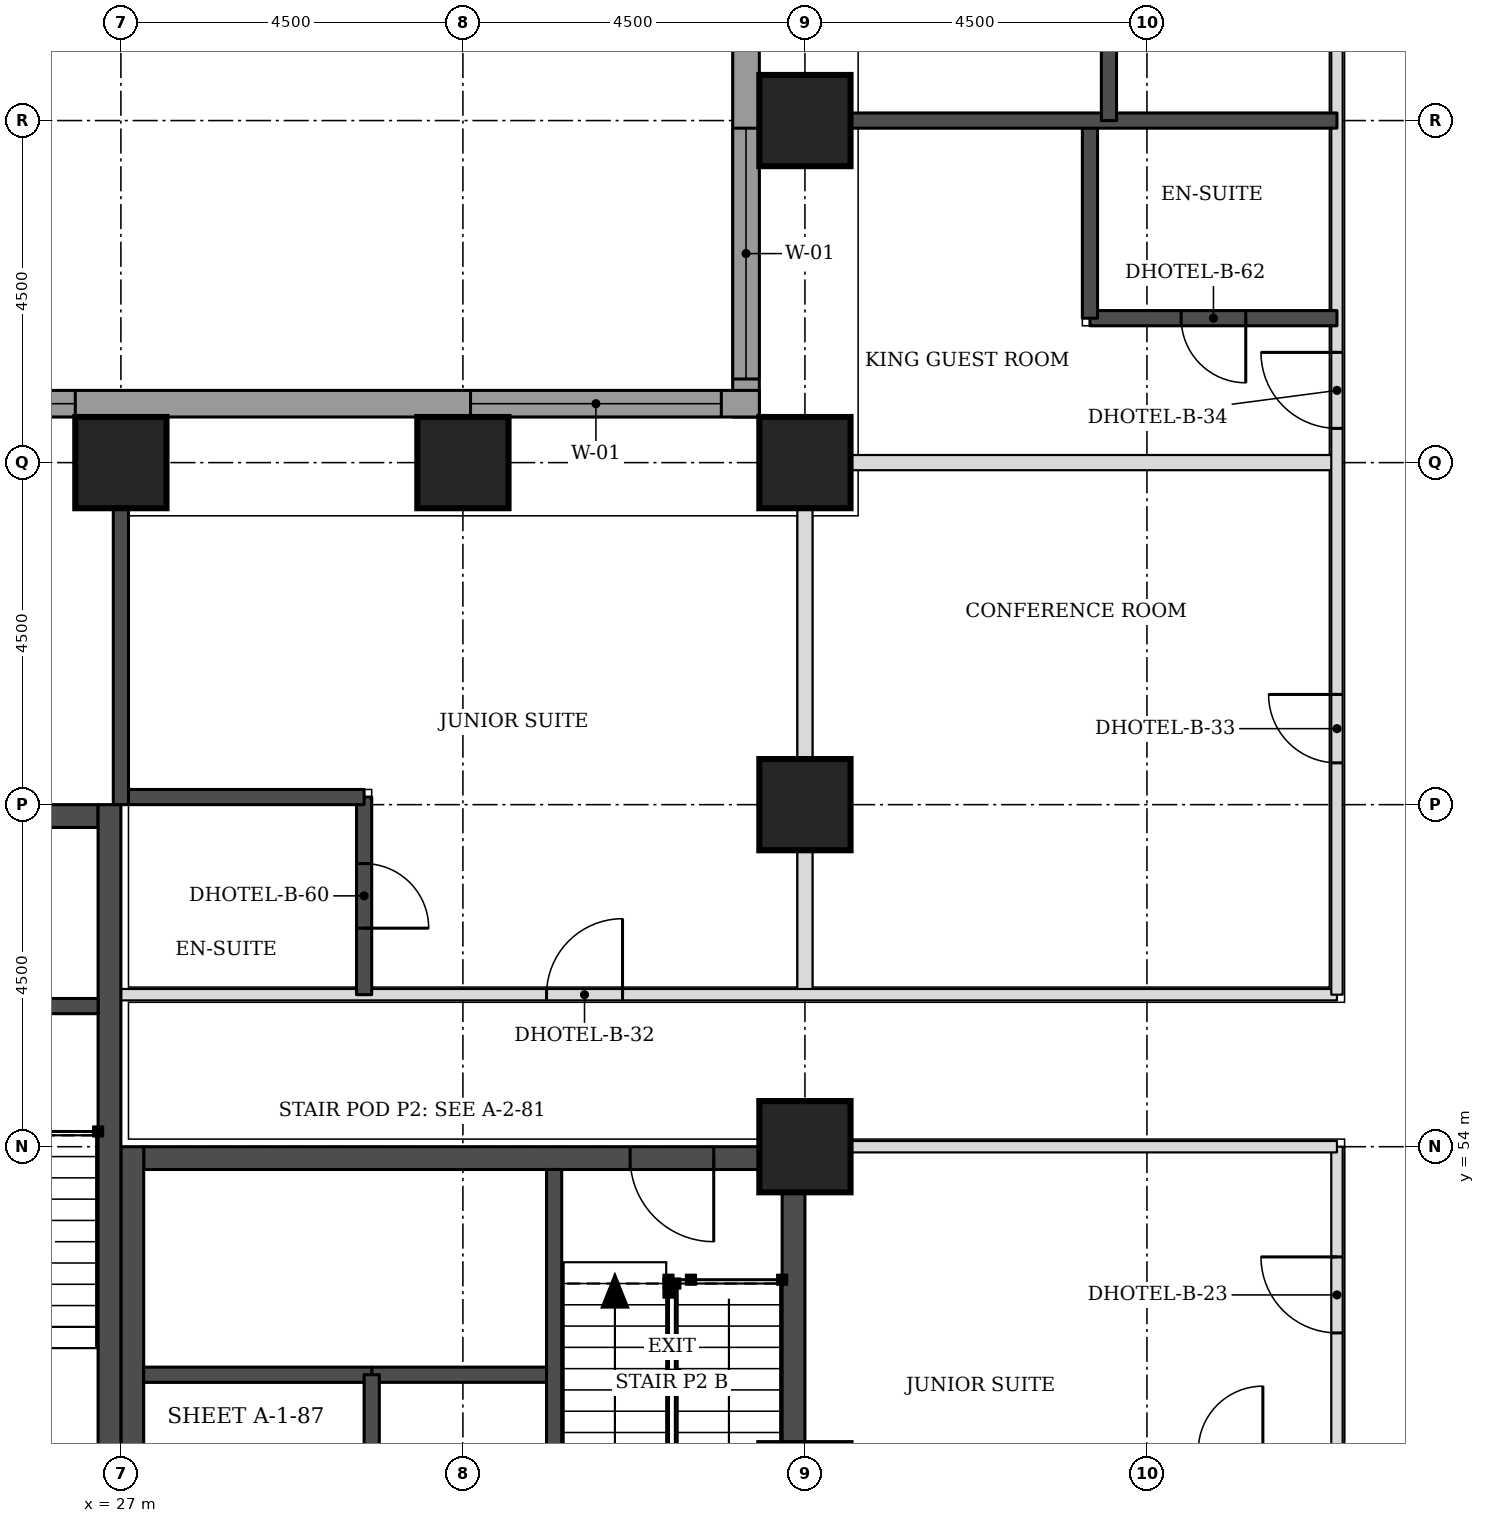
"""IFC4 building model, lengths in metres.
Left out: names, types, materials, properties, quantities, classifications, styles, units other than length and angle.
Written with IfcOpenShell. Run it as: python <this file> out.ifc"""

import sys

from ifc_helpers import new_model, si_unit, direction, frame, frame_2d, origin, origin_2d, place, context, subcontext, project, spatial, rectangle, extrude, element, fill, save


model = new_model("IFC4")
c1 = context("Model", 3, precision=1e-05, world=origin(), true_north=direction((0.0, 1.0)))
c2 = subcontext(c1, "Body", "Model", "MODEL_VIEW")
j1 = project(units=[si_unit("LENGTHUNIT", "METRE"), si_unit("PLANEANGLEUNIT", "RADIAN")], contexts=[c1])
p1 = place(None, origin())
s1 = spatial("IfcSite", under=j1, at=p1, CompositionType="ELEMENT")
p2 = place(p1, origin())
s2 = spatial("IfcBuilding", under=s1, at=p2, CompositionType="ELEMENT")
p3 = place(p2, frame((0.0, 0.0, 52.8)))
s3 = spatial("IfcBuildingStorey", under=s2, at=p3, CompositionType="ELEMENT", Elevation=52.8)
for number, where, z_axis, x_axis in (
    (1, (36.0, 54.0, 0.0), (0.0, 0.0, 1.0), (1.0, 0.0, 0.0)),
    (2, (36.0, 58.5, 0.0), (0.0, 0.0, 1.0), (1.0, 0.0, 0.0)),
    (3, (27.0, 63.0, 0.0), (0.0, 0.0, 1.0), (1.0, 0.0, 0.0)),
    (4, (31.5, 63.0, 0.0), (0.0, 0.0, 1.0), (1.0, 0.0, 0.0)),
    (5, (36.0, 63.0, 0.0), (0.0, 0.0, 1.0), (1.0, 0.0, 0.0)),
    (6, (36.0, 67.5, 0.0), (0.0, 0.0, 1.0), (1.0, 0.0, 0.0)),
):
    element("IfcColumn", number, at=place(p3, frame(where, z_axis=z_axis, x_axis=x_axis)), inside=s3, PredefinedType="COLUMN", context=c2, shape_type="SweptSolid", body=[
        extrude(rectangle(XDim=1.2, YDim=1.2, at=origin_2d()), origin(), (0.0, 0.0, 1.0), 3.3),
    ])
p4 = place(p3, frame((27.3, 53.85, 0.0), z_axis=(0.0, 0.0, 1.0), x_axis=(1.0, 0.0, 0.0)))
e7 = element("IfcWall", 7, at=p4, inside=s3, PredefinedType="SHEAR", context=c2, shape_type="SweptSolid", body=[
    extrude(rectangle(XDim=8.4, YDim=0.3, at=frame_2d((4.2, 0.0))), origin(), (0.0, 0.0, 1.0), 3.3),
])
p5 = place(p4, frame((6.4, 0.0, 0.0)))
e8 = element("IfcOpeningElement", 8, at=p5, cuts=e7, PredefinedType="OPENING", context=c2, shape_type="SweptSolid", body=[
    extrude(rectangle(XDim=1.1, YDim=2.1, at=frame_2d((0.55, 1.05))), frame((0.0, 0.16, 0.0), z_axis=(0.0, -1.0, 0.0), x_axis=(1.0, 0.0, 0.0)), (0.0, 0.0, 1.0), 0.32),
])
p6 = place(p3, frame((27.15, 45.0, 0.0), z_axis=(0.0, 0.0, 1.0), x_axis=(0.0, 1.0, 0.0)))
e9 = element("IfcWall", 9, at=p6, inside=s3, PredefinedType="SHEAR", context=c2, shape_type="SweptSolid", body=[
    extrude(rectangle(XDim=9.0, YDim=0.3, at=frame_2d((4.5, 0.0))), origin(), (0.0, 0.0, 1.0), 3.3),
])
p7 = place(p6, frame((0.4, 0.0, 0.0)))
e10 = element("IfcOpeningElement", 10, at=p7, cuts=e9, PredefinedType="OPENING", context=c2, shape_type="SweptSolid", body=[
    extrude(rectangle(XDim=1.1, YDim=2.1, at=frame_2d((0.55, 1.05))), frame((0.0, 0.16, 0.0), z_axis=(0.0, -1.0, 0.0), x_axis=(1.0, 0.0, 0.0)), (0.0, 0.0, 1.0), 0.32),
])
p8 = place(p3, frame((35.85, 45.0, 0.0), z_axis=(0.0, 0.0, 1.0), x_axis=(0.0, 1.0, 0.0)))
e11 = element("IfcWall", 11, at=p8, inside=s3, PredefinedType="SHEAR", context=c2, shape_type="SweptSolid", body=[
    extrude(rectangle(XDim=9.0, YDim=0.3, at=frame_2d((4.5, 0.0))), origin(), (0.0, 0.0, 1.0), 3.3),
])
p9 = place(p3, frame((18.3, 58.35, 0.0), z_axis=(0.0, 0.0, 1.0), x_axis=(1.0, 0.0, 0.0)))
e12 = element("IfcWall", 12, at=p9, inside=s3, PredefinedType="SHEAR", context=c2, shape_type="SweptSolid", body=[
    extrude(rectangle(XDim=8.4, YDim=0.3, at=frame_2d((4.2, 0.0))), origin(), (0.0, 0.0, 1.0), 3.3),
])
p10 = place(p9, frame((3.3, 0.0, 0.0)))
e13 = element("IfcOpeningElement", 13, at=p10, cuts=e12, PredefinedType="OPENING", context=c2, shape_type="SweptSolid", body=[
    extrude(rectangle(XDim=1.8, YDim=2.1, at=frame_2d((0.9, 1.05))), frame((0.0, 0.16, 0.0), z_axis=(0.0, -1.0, 0.0), x_axis=(1.0, 0.0, 0.0)), (0.0, 0.0, 1.0), 0.32),
])
p11 = place(p3, frame((26.85, 49.5, 0.0), z_axis=(0.0, 0.0, 1.0), x_axis=(0.0, 1.0, 0.0)))
e14 = element("IfcWall", 14, at=p11, inside=s3, PredefinedType="SHEAR", context=c2, shape_type="SweptSolid", body=[
    extrude(rectangle(XDim=9.0, YDim=0.3, at=frame_2d((4.5, 0.0))), origin(), (0.0, 0.0, 1.0), 3.3),
])
p12 = place(p3, frame((35.225, 76.894, 0.0), z_axis=(0.0, 0.0, 1.0), x_axis=(0.0, -1.0, 0.0)))
e15 = element("IfcWall", 15, at=p12, inside=s3, PredefinedType="STANDARD", context=c2, shape_type="SweptSolid", body=[
    extrude(rectangle(XDim=13.293, YDim=0.35, at=frame_2d((6.647, 0.0))), origin(), (0.0, 0.0, 1.0), 3.055),
])
p13 = place(p12, frame((9.493, 0.0, 0.8)))
e16 = element("IfcOpeningElement", 16, at=p13, cuts=e15, PredefinedType="OPENING", context=c2, shape_type="SweptSolid", body=[
    extrude(rectangle(XDim=3.3, YDim=1.5, at=frame_2d((1.65, 0.75))), frame((0.0, 0.185, 0.0), z_axis=(0.0, -1.0, 0.0), x_axis=(1.0, 0.0, 0.0)), (0.0, 0.0, 1.0), 0.37),
])
p14 = place(p3, frame((35.4, 63.775, 0.0), z_axis=(0.0, 0.0, 1.0), x_axis=(-1.0, 0.0, 0.0)))
e17 = element("IfcWall", 17, at=p14, inside=s3, PredefinedType="STANDARD", context=c2, shape_type="SweptSolid", body=[
    extrude(rectangle(XDim=17.793, YDim=0.35, at=frame_2d((8.897, 0.0))), origin(), (0.0, 0.0, 1.0), 3.055),
])
p15 = place(p14, frame((0.5, 0.0, 0.8)))
e18 = element("IfcOpeningElement", 18, at=p15, cuts=e17, PredefinedType="OPENING", context=c2, shape_type="SweptSolid", body=[
    extrude(rectangle(XDim=3.3, YDim=1.5, at=frame_2d((1.65, 0.75))), frame((0.0, 0.185, 0.0), z_axis=(0.0, -1.0, 0.0), x_axis=(1.0, 0.0, 0.0)), (0.0, 0.0, 1.0), 0.37),
])
p16 = place(p14, frame((9.0, 0.0, 0.8)))
e19 = element("IfcOpeningElement", 19, at=p16, cuts=e17, PredefinedType="OPENING", context=c2, shape_type="SweptSolid", body=[
    extrude(rectangle(XDim=3.3, YDim=1.5, at=frame_2d((1.65, 0.75))), frame((0.0, 0.185, 0.0), z_axis=(0.0, -1.0, 0.0), x_axis=(1.0, 0.0, 0.0)), (0.0, 0.0, 1.0), 0.37),
])
p17 = place(p3, frame((36.0, 56.0, 0.0), z_axis=(0.0, 0.0, 1.0), x_axis=(0.0, 1.0, 0.0)))
e20 = element("IfcWall", 20, at=p17, inside=s3, PredefinedType="PARTITIONING", context=c2, shape_type="SweptSolid", body=[
    extrude(rectangle(XDim=6.4, YDim=0.2, at=frame_2d((3.2, 0.0))), origin(), (0.0, 0.0, 1.0), 2.33),
])
p18 = place(p3, frame((36.6, 63.0, 0.0), z_axis=(0.0, 0.0, 1.0), x_axis=(1.0, 0.0, 0.0)))
e21 = element("IfcWall", 21, at=p18, inside=s3, PredefinedType="PARTITIONING", context=c2, shape_type="SweptSolid", body=[
    extrude(rectangle(XDim=6.4, YDim=0.2, at=frame_2d((3.2, 0.0))), origin(), (0.0, 0.0, 1.0), 3.08),
])
p19 = place(p3, frame((43.0, 47.5, 0.0), z_axis=(0.0, 0.0, 1.0), x_axis=(0.0, 1.0, 0.0)))
e22 = element("IfcWall", 22, at=p19, inside=s3, PredefinedType="PARTITIONING", context=c2, shape_type="SweptSolid", body=[
    extrude(rectangle(XDim=6.5, YDim=0.15, at=frame_2d((3.25, 0.0))), origin(), (0.0, 0.0, 1.0), 3.08),
])
p20 = place(p19, frame((4.05, 0.0, 0.0)))
e23 = element("IfcOpeningElement", 23, at=p20, cuts=e22, PredefinedType="OPENING", context=c2, shape_type="SweptSolid", body=[
    extrude(rectangle(XDim=1.0, YDim=2.1, at=frame_2d((0.5, 1.05))), frame((0.0, 0.085, 0.0), z_axis=(0.0, -1.0, 0.0), x_axis=(1.0, 0.0, 0.0)), (0.0, 0.0, 1.0), 0.17),
])
p21 = place(p3, frame((36.05, 54.0, 0.0), z_axis=(0.0, 0.0, 1.0), x_axis=(1.0, 0.0, 0.0)))
e24 = element("IfcWall", 24, at=p21, inside=s3, PredefinedType="PARTITIONING", context=c2, shape_type="SweptSolid", body=[
    extrude(rectangle(XDim=6.95, YDim=0.15, at=frame_2d((3.475, 0.0))), origin(), (0.0, 0.0, 1.0), 3.08),
])
p22 = place(p3, frame((27.0, 56.0, 0.0), z_axis=(0.0, 0.0, 1.0), x_axis=(1.0, 0.0, 0.0)))
e25 = element("IfcWall", 25, at=p22, inside=s3, PredefinedType="PARTITIONING", context=c2, shape_type="SweptSolid", body=[
    extrude(rectangle(XDim=16.0, YDim=0.15, at=frame_2d((8.0, 0.0))), origin(), (0.0, 0.0, 1.0), 3.08),
])
p23 = place(p22, frame((5.6, 0.0, 0.0)))
e26 = element("IfcOpeningElement", 26, at=p23, cuts=e25, PredefinedType="OPENING", context=c2, shape_type="SweptSolid", body=[
    extrude(rectangle(XDim=1.0, YDim=2.1, at=frame_2d((0.5, 1.05))), frame((0.0, 0.085, 0.0), z_axis=(0.0, -1.0, 0.0), x_axis=(1.0, 0.0, 0.0)), (0.0, 0.0, 1.0), 0.17),
])
p24 = place(p3, frame((43.0, 56.0, 0.0), z_axis=(0.0, 0.0, 1.0), x_axis=(0.0, 1.0, 0.0)))
e27 = element("IfcWall", 27, at=p24, inside=s3, PredefinedType="PARTITIONING", context=c2, shape_type="SweptSolid", body=[
    extrude(rectangle(XDim=18.0, YDim=0.15, at=frame_2d((9.0, 0.0))), origin(), (0.0, 0.0, 1.0), 3.08),
])
p25 = place(p24, frame((7.45, 0.0, 0.0)))
e28 = element("IfcOpeningElement", 28, at=p25, cuts=e27, PredefinedType="OPENING", context=c2, shape_type="SweptSolid", body=[
    extrude(rectangle(XDim=1.0, YDim=2.1, at=frame_2d((0.5, 1.05))), frame((0.0, 0.085, 0.0), z_axis=(0.0, -1.0, 0.0), x_axis=(1.0, 0.0, 0.0)), (0.0, 0.0, 1.0), 0.17),
])
p26 = place(p24, frame((14.3, 0.0, 0.0)))
e29 = element("IfcOpeningElement", 29, at=p26, cuts=e27, PredefinedType="OPENING", context=c2, shape_type="SweptSolid", body=[
    extrude(rectangle(XDim=1.0, YDim=2.1, at=frame_2d((0.5, 1.05))), frame((0.0, 0.085, 0.0), z_axis=(0.0, -1.0, 0.0), x_axis=(1.0, 0.0, 0.0)), (0.0, 0.0, 1.0), 0.17),
])
p27 = place(p24, frame((16.45, 0.0, 0.0)))
e30 = element("IfcOpeningElement", 30, at=p27, cuts=e27, PredefinedType="OPENING", context=c2, shape_type="SweptSolid", body=[
    extrude(rectangle(XDim=1.0, YDim=2.1, at=frame_2d((0.5, 1.05))), frame((0.0, 0.085, 0.0), z_axis=(0.0, -1.0, 0.0), x_axis=(1.0, 0.0, 0.0)), (0.0, 0.0, 1.0), 0.17),
])
p28 = place(p24, frame((3.05, 0.0, 0.0)))
e31 = element("IfcOpeningElement", 31, at=p28, cuts=e27, PredefinedType="OPENING", context=c2, shape_type="SweptSolid", body=[
    extrude(rectangle(XDim=0.9, YDim=2.1, at=frame_2d((0.45, 1.05))), frame((0.0, 0.085, 0.0), z_axis=(0.0, -1.0, 0.0), x_axis=(1.0, 0.0, 0.0)), (0.0, 0.0, 1.0), 0.17),
])
p29 = place(p3, frame((27.0, 58.5, 0.0), z_axis=(0.0, 0.0, 1.0), x_axis=(0.0, 1.0, 0.0)))
e32 = element("IfcWall", 32, at=p29, inside=s3, PredefinedType="SOLIDWALL", context=c2, shape_type="SweptSolid", body=[
    extrude(rectangle(XDim=3.9, YDim=0.2, at=frame_2d((1.95, 0.0))), origin(), (0.0, 0.0, 1.0), 3.08),
])
p30 = place(p3, frame((30.2, 56.0, 0.0), z_axis=(0.0, 0.0, 1.0), x_axis=(0.0, 1.0, 0.0)))
e33 = element("IfcWall", 33, at=p30, inside=s3, PredefinedType="SOLIDWALL", context=c2, shape_type="SweptSolid", body=[
    extrude(rectangle(XDim=2.6, YDim=0.2, at=frame_2d((1.3, 0.0))), origin(), (0.0, 0.0, 1.0), 3.08),
])
p31 = place(p30, frame((0.875, 0.0, 0.0)))
e34 = element("IfcOpeningElement", 34, at=p31, cuts=e33, PredefinedType="OPENING", context=c2, shape_type="SweptSolid", body=[
    extrude(rectangle(XDim=0.85, YDim=2.1, at=frame_2d((0.425, 1.05))), frame((0.0, 0.11, 0.0), z_axis=(0.0, -1.0, 0.0), x_axis=(1.0, 0.0, 0.0)), (0.0, 0.0, 1.0), 0.22),
])
p32 = place(p3, frame((27.1, 58.6, 0.0), z_axis=(0.0, 0.0, 1.0), x_axis=(1.0, 0.0, 0.0)))
e35 = element("IfcWall", 35, at=p32, inside=s3, PredefinedType="SOLIDWALL", context=c2, shape_type="SweptSolid", body=[
    extrude(rectangle(XDim=3.1, YDim=0.2, at=frame_2d((1.55, 0.0))), origin(), (0.0, 0.0, 1.0), 3.08),
])
p33 = place(p3, frame((39.75, 64.9, 0.0), z_axis=(0.0, 0.0, 1.0), x_axis=(1.0, 0.0, 0.0)))
e36 = element("IfcWall", 36, at=p33, inside=s3, PredefinedType="SOLIDWALL", context=c2, shape_type="SweptSolid", body=[
    extrude(rectangle(XDim=3.25, YDim=0.2, at=frame_2d((1.625, 0.0))), origin(), (0.0, 0.0, 1.0), 3.08),
])
p34 = place(p33, frame((1.2, 0.0, 0.0)))
e37 = element("IfcOpeningElement", 37, at=p34, cuts=e36, PredefinedType="OPENING", context=c2, shape_type="SweptSolid", body=[
    extrude(rectangle(XDim=0.85, YDim=2.1, at=frame_2d((0.425, 1.05))), frame((0.0, 0.11, 0.0), z_axis=(0.0, -1.0, 0.0), x_axis=(1.0, 0.0, 0.0)), (0.0, 0.0, 1.0), 0.22),
])
p35 = place(p3, frame((39.75, 64.9, 0.0), z_axis=(0.0, 0.0, 1.0), x_axis=(0.0, 1.0, 0.0)))
e38 = element("IfcWall", 38, at=p35, inside=s3, PredefinedType="SOLIDWALL", context=c2, shape_type="SweptSolid", body=[
    extrude(rectangle(XDim=2.6, YDim=0.2, at=frame_2d((1.3, 0.0))), origin(), (0.0, 0.0, 1.0), 3.08),
])
p36 = place(p3, frame((36.6, 67.5, 0.0), z_axis=(0.0, 0.0, 1.0), x_axis=(1.0, 0.0, 0.0)))
e39 = element("IfcWall", 39, at=p36, inside=s3, PredefinedType="SOLIDWALL", context=c2, shape_type="SweptSolid", body=[
    extrude(rectangle(XDim=6.4, YDim=0.2, at=frame_2d((3.2, 0.0))), origin(), (0.0, 0.0, 1.0), 3.08),
])
p37 = place(p3, frame((40.0, 67.5, 0.0), z_axis=(0.0, 0.0, 1.0), x_axis=(0.0, 1.0, 0.0)))
e40 = element("IfcWall", 40, at=p37, inside=s3, PredefinedType="SOLIDWALL", context=c2, shape_type="SweptSolid", body=[
    extrude(rectangle(XDim=2.1, YDim=0.2, at=frame_2d((1.05, 0.0))), origin(), (0.0, 0.0, 1.0), 3.08),
])
p38 = place(p3, frame((30.3, 51.0, 0.0), z_axis=(0.0, 0.0, 1.0), x_axis=(1.0, 0.0, 0.0)))
e41 = element("IfcWall", 41, at=p38, inside=s3, PredefinedType="SOLIDWALL", context=c2, shape_type="SweptSolid", body=[
    extrude(rectangle(XDim=2.4, YDim=0.2, at=frame_2d((1.2, 0.0))), origin(), (0.0, 0.0, 1.0), 3.3),
])
p39 = place(p3, frame((27.3, 51.0, 0.0), z_axis=(0.0, 0.0, 1.0), x_axis=(1.0, 0.0, 0.0)))
e42 = element("IfcWall", 42, at=p39, inside=s3, PredefinedType="SOLIDWALL", context=c2, shape_type="SweptSolid", body=[
    extrude(rectangle(XDim=3.0, YDim=0.2, at=frame_2d((1.5, 0.0))), origin(), (0.0, 0.0, 1.0), 3.08),
])
for number, where, z_axis, x_axis in (
    (43, (30.3, 45.3, 0.0), (0.0, 0.0, 1.0), (0.0, 1.0, 0.0)),
    (44, (32.7, 48.0, 0.0), (0.0, 0.0, 1.0), (0.0, 1.0, 0.0)),
):
    element("IfcWall", number, at=place(p3, frame(where, z_axis=z_axis, x_axis=x_axis)), inside=s3, PredefinedType="SOLIDWALL", context=c2, shape_type="SweptSolid", body=[
        extrude(rectangle(XDim=5.7, YDim=0.2, at=frame_2d((2.85, 0.0))), origin(), (0.0, 0.0, 1.0), 3.08),
    ])
p40 = place(p3, frame((23.2, 55.85, 0.0), z_axis=(0.0, 0.0, 1.0), x_axis=(1.0, 0.0, 0.0)))
e45 = element("IfcWall", 45, at=p40, inside=s3, PredefinedType="SOLIDWALL", context=c2, shape_type="SweptSolid", body=[
    extrude(rectangle(XDim=3.5, YDim=0.2, at=frame_2d((1.75, 0.0))), origin(), (0.0, 0.0, 1.0), 3.08),
])
p41 = place(p40, frame((1.2, 0.0, 0.0)))
e46 = element("IfcOpeningElement", 46, at=p41, cuts=e45, PredefinedType="OPENING", context=c2, shape_type="SweptSolid", body=[
    extrude(rectangle(XDim=1.1, YDim=2.1, at=frame_2d((0.55, 1.05))), frame((0.0, 0.11, 0.0), z_axis=(0.0, -1.0, 0.0), x_axis=(1.0, 0.0, 0.0)), (0.0, 0.0, 1.0), 0.22),
])
p42 = place(p13, origin())
e47 = element("IfcWindow", 47, at=p42, inside=s3, PartitioningType="SINGLE_PANEL", PredefinedType="WINDOW", context=c2, shape_type="SweptSolid", body=[
    extrude(rectangle(XDim=3.3, YDim=1.5, at=frame_2d((1.65, 0.75))), frame((0.0, 0.085, 0.0), z_axis=(0.0, -1.0, 0.0), x_axis=(1.0, 0.0, 0.0)), (0.0, 0.0, 1.0), 0.06),
])
fill(e16, e47)
p43 = place(p15, origin())
e48 = element("IfcWindow", 48, at=p43, inside=s3, PartitioningType="SINGLE_PANEL", PredefinedType="WINDOW", context=c2, shape_type="SweptSolid", body=[
    extrude(rectangle(XDim=3.3, YDim=1.5, at=frame_2d((1.65, 0.75))), frame((0.0, 0.085, 0.0), z_axis=(0.0, -1.0, 0.0), x_axis=(1.0, 0.0, 0.0)), (0.0, 0.0, 1.0), 0.06),
])
fill(e18, e48)
p44 = place(p16, origin())
e49 = element("IfcWindow", 49, at=p44, inside=s3, PartitioningType="SINGLE_PANEL", PredefinedType="WINDOW", context=c2, shape_type="SweptSolid", body=[
    extrude(rectangle(XDim=3.3, YDim=1.5, at=frame_2d((1.65, 0.75))), frame((0.0, 0.085, 0.0), z_axis=(0.0, -1.0, 0.0), x_axis=(1.0, 0.0, 0.0)), (0.0, 0.0, 1.0), 0.06),
])
fill(e19, e49)
p45 = place(p23, origin())
e50 = element("IfcDoor", 50, at=p45, inside=s3, OperationType="SINGLE_SWING_RIGHT", PredefinedType="DOOR", context=c2, shape_type="SweptSolid", body=[
    extrude(rectangle(XDim=1.0, YDim=2.1, at=frame_2d((0.5, 1.05))), frame((0.0, 0.025, 0.0), z_axis=(0.0, -1.0, 0.0), x_axis=(1.0, 0.0, 0.0)), (0.0, 0.0, 1.0), 0.05),
])
fill(e26, e50)
p46 = place(p31, frame((0.85, 0.0, 0.0), z_axis=(0.0, 0.0, 1.0), x_axis=(-1.0, 0.0, 0.0)))
e51 = element("IfcDoor", 51, at=p46, inside=s3, OperationType="SINGLE_SWING_RIGHT", PredefinedType="DOOR", context=c2, shape_type="SweptSolid", body=[
    extrude(rectangle(XDim=0.85, YDim=2.1, at=frame_2d((0.425, 1.05))), frame((0.0, 0.025, 0.0), z_axis=(0.0, -1.0, 0.0), x_axis=(1.0, 0.0, 0.0)), (0.0, 0.0, 1.0), 0.05),
])
fill(e34, e51)
p47 = place(p25, origin())
e52 = element("IfcDoor", 52, at=p47, inside=s3, OperationType="SINGLE_SWING_RIGHT", PredefinedType="DOOR", context=c2, shape_type="SweptSolid", body=[
    extrude(rectangle(XDim=1.0, YDim=2.1, at=frame_2d((0.5, 1.05))), frame((0.0, 0.025, 0.0), z_axis=(0.0, -1.0, 0.0), x_axis=(1.0, 0.0, 0.0)), (0.0, 0.0, 1.0), 0.05),
])
fill(e28, e52)
p48 = place(p34, frame((0.85, 0.0, 0.0), z_axis=(0.0, 0.0, 1.0), x_axis=(-1.0, 0.0, 0.0)))
e53 = element("IfcDoor", 53, at=p48, inside=s3, OperationType="SINGLE_SWING_LEFT", PredefinedType="DOOR", context=c2, shape_type="SweptSolid", body=[
    extrude(rectangle(XDim=0.85, YDim=2.1, at=frame_2d((0.425, 1.05))), frame((0.0, 0.025, 0.0), z_axis=(0.0, -1.0, 0.0), x_axis=(1.0, 0.0, 0.0)), (0.0, 0.0, 1.0), 0.05),
])
fill(e37, e53)
p49 = place(p28, origin())
e54 = element("IfcDoor", 54, at=p49, inside=s3, OperationType="SINGLE_SWING_RIGHT", PredefinedType="DOOR", context=c2, shape_type="SweptSolid", body=[
    extrude(rectangle(XDim=0.9, YDim=2.1, at=frame_2d((0.45, 1.05))), frame((0.0, 0.025, 0.0), z_axis=(0.0, -1.0, 0.0), x_axis=(1.0, 0.0, 0.0)), (0.0, 0.0, 1.0), 0.05),
])
fill(e31, e54)
p50 = place(p20, origin())
e55 = element("IfcDoor", 55, at=p50, inside=s3, OperationType="SINGLE_SWING_RIGHT", PredefinedType="DOOR", context=c2, shape_type="SweptSolid", body=[
    extrude(rectangle(XDim=1.0, YDim=2.1, at=frame_2d((0.5, 1.05))), frame((0.0, 0.025, 0.0), z_axis=(0.0, -1.0, 0.0), x_axis=(1.0, 0.0, 0.0)), (0.0, 0.0, 1.0), 0.05),
])
fill(e23, e55)
p51 = place(p5, frame((1.1, 0.0, 0.0), z_axis=(0.0, 0.0, 1.0), x_axis=(-1.0, 0.0, 0.0)))
e56 = element("IfcDoor", 56, at=p51, inside=s3, OperationType="SINGLE_SWING_LEFT", PredefinedType="DOOR", context=c2, shape_type="SweptSolid", body=[
    extrude(rectangle(XDim=1.1, YDim=2.1, at=frame_2d((0.55, 1.05))), frame((0.0, 0.025, 0.0), z_axis=(0.0, -1.0, 0.0), x_axis=(1.0, 0.0, 0.0)), (0.0, 0.0, 1.0), 0.05),
])
fill(e8, e56)
save(model, sys.argv[1])
